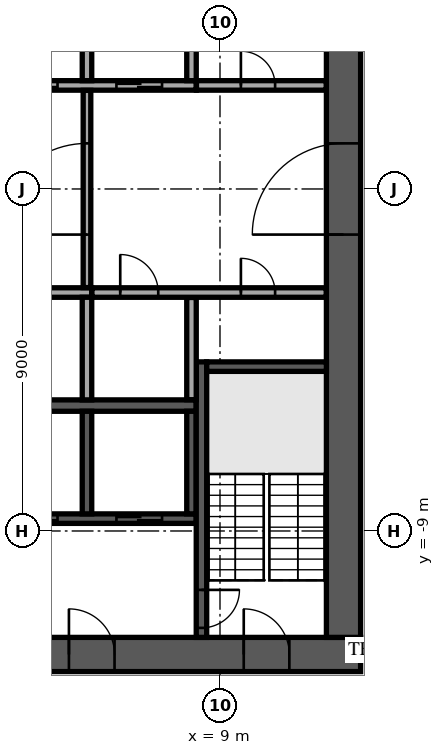
"""IFC4 building model, lengths in metres.
Left out: names, types, materials, properties, quantities, classifications, styles, units other than length and angle.
Written with IfcOpenShell. Run it as: python <this file> out.ifc"""

import sys

from ifc_helpers import new_model, si_unit, direction, frame, frame_2d, origin, place, context, subcontext, project, spatial, rectangle, extrude, element, fill, save


model = new_model("IFC4")
c1 = context("Model", 3, precision=1e-05, world=origin(), true_north=direction((0.0, 1.0)))
c2 = subcontext(c1, "Body", "Model", "MODEL_VIEW")
j1 = project(units=[si_unit("LENGTHUNIT", "METRE"), si_unit("PLANEANGLEUNIT", "RADIAN")], contexts=[c1])
p1 = place(None, origin())
s1 = spatial("IfcSite", under=j1, at=p1, CompositionType="ELEMENT")
p2 = place(p1, origin())
s2 = spatial("IfcBuilding", under=s1, at=p2, CompositionType="ELEMENT")
p3 = place(p2, frame((0.0, 0.0, 197.3)))
s3 = spatial("IfcBuildingStorey", under=s2, at=p3, CompositionType="ELEMENT", Elevation=197.3)
p4 = place(p3, frame((-12.7, -12.25, 0.0), z_axis=(0.0, 0.0, 1.0), x_axis=(1.0, 0.0, 0.0)))
e1 = element("IfcWall", 1, at=p4, inside=s3, PredefinedType="SHEAR", context=c2, shape_type="SweptSolid", body=[
    extrude(rectangle(XDim=25.4, YDim=0.9, at=frame_2d((12.7, 0.0))), origin(), (0.0, 0.0, 1.0), 3.62),
])
p5 = place(p4, frame((7.6, 0.0, 0.0)))
e2 = element("IfcOpeningElement", 2, at=p5, cuts=e1, PredefinedType="OPENING", context=c2, shape_type="SweptSolid", body=[
    extrude(rectangle(XDim=2.0, YDim=2.1, at=frame_2d((1.0, 1.05))), frame((0.0, 0.46, 0.0), z_axis=(0.0, -1.0, 0.0), x_axis=(1.0, 0.0, 0.0)), (0.0, 0.0, 1.0), 0.92),
])
p6 = place(p4, frame((17.725, 0.0, 0.0)))
e3 = element("IfcOpeningElement", 3, at=p6, cuts=e1, PredefinedType="OPENING", context=c2, shape_type="SweptSolid", body=[
    extrude(rectangle(XDim=1.2, YDim=2.1, at=frame_2d((0.6, 1.05))), frame((0.0, 0.46, 0.0), z_axis=(0.0, -1.0, 0.0), x_axis=(1.0, 0.0, 0.0)), (0.0, 0.0, 1.0), 0.92),
])
p7 = place(p4, frame((1.875, 0.0, 0.0)))
e4 = element("IfcOpeningElement", 4, at=p7, cuts=e1, PredefinedType="OPENING", context=c2, shape_type="SweptSolid", body=[
    extrude(rectangle(XDim=1.2, YDim=2.1, at=frame_2d((0.6, 1.05))), frame((0.0, 0.46, 0.0), z_axis=(0.0, -1.0, 0.0), x_axis=(1.0, 0.0, 0.0)), (0.0, 0.0, 1.0), 0.92),
])
p8 = place(p4, frame((22.325, 0.0, 0.0)))
e5 = element("IfcOpeningElement", 5, at=p8, cuts=e1, PredefinedType="OPENING", context=c2, shape_type="SweptSolid", body=[
    extrude(rectangle(XDim=1.2, YDim=2.1, at=frame_2d((0.6, 1.05))), frame((0.0, 0.46, 0.0), z_axis=(0.0, -1.0, 0.0), x_axis=(1.0, 0.0, 0.0)), (0.0, 0.0, 1.0), 0.92),
])
p9 = place(p3, frame((12.25, -11.8, 0.0), z_axis=(0.0, 0.0, 1.0), x_axis=(0.0, 1.0, 0.0)))
e6 = element("IfcWall", 6, at=p9, inside=s3, PredefinedType="SHEAR", context=c2, shape_type="SweptSolid", body=[
    extrude(rectangle(XDim=23.6, YDim=0.9, at=frame_2d((11.8, 0.0))), origin(), (0.0, 0.0, 1.0), 3.62),
])
p10 = place(p9, frame((10.6, 0.0, 0.0)))
e7 = element("IfcOpeningElement", 7, at=p10, cuts=e6, PredefinedType="OPENING", context=c2, shape_type="SweptSolid", body=[
    extrude(rectangle(XDim=2.4, YDim=2.4, at=frame_2d((1.2, 1.2))), frame((0.0, 0.46, 0.0), z_axis=(0.0, -1.0, 0.0), x_axis=(1.0, 0.0, 0.0)), (0.0, 0.0, 1.0), 0.92),
])
p11 = place(p3, frame((-2.875, -5.7, 0.0), z_axis=(0.0, 0.0, 1.0), x_axis=(1.0, 0.0, 0.0)))
e8 = element("IfcWall", 8, at=p11, inside=s3, PredefinedType="SOLIDWALL", context=c2, shape_type="SweptSolid", body=[
    extrude(rectangle(XDim=11.25, YDim=0.3, at=frame_2d((5.625, 0.0))), origin(), (0.0, 0.0, 1.0), 3.62),
])
p12 = place(p3, frame((-8.375, 2.725, 0.0), z_axis=(0.0, 0.0, 1.0), x_axis=(1.0, 0.0, 0.0)))
e9 = element("IfcWall", 9, at=p12, inside=s3, PredefinedType="SOLIDWALL", context=c2, shape_type="SweptSolid", body=[
    extrude(rectangle(XDim=16.75, YDim=0.25, at=frame_2d((8.375, 0.0))), origin(), (0.0, 0.0, 1.0), 3.62),
])
p13 = place(p12, frame((0.9, 0.0, 0.0)))
e10 = element("IfcOpeningElement", 10, at=p13, cuts=e9, PredefinedType="OPENING", context=c2, shape_type="SweptSolid", body=[
    extrude(rectangle(XDim=1.2, YDim=2.1, at=frame_2d((0.6, 1.05))), frame((0.0, 0.135, 0.0), z_axis=(0.0, -1.0, 0.0), x_axis=(1.0, 0.0, 0.0)), (0.0, 0.0, 1.0), 0.27),
])
p14 = place(p12, frame((3.65, 0.0, 0.0)))
e11 = element("IfcOpeningElement", 11, at=p14, cuts=e9, PredefinedType="OPENING", context=c2, shape_type="SweptSolid", body=[
    extrude(rectangle(XDim=1.2, YDim=2.1, at=frame_2d((0.6, 1.05))), frame((0.0, 0.135, 0.0), z_axis=(0.0, -1.0, 0.0), x_axis=(1.0, 0.0, 0.0)), (0.0, 0.0, 1.0), 0.27),
])
p15 = place(p12, frame((6.4, 0.0, 0.0)))
e12 = element("IfcOpeningElement", 12, at=p15, cuts=e9, PredefinedType="OPENING", context=c2, shape_type="SweptSolid", body=[
    extrude(rectangle(XDim=1.2, YDim=2.1, at=frame_2d((0.6, 1.05))), frame((0.0, 0.135, 0.0), z_axis=(0.0, -1.0, 0.0), x_axis=(1.0, 0.0, 0.0)), (0.0, 0.0, 1.0), 0.27),
])
p16 = place(p12, frame((9.15, 0.0, 0.0)))
e13 = element("IfcOpeningElement", 13, at=p16, cuts=e9, PredefinedType="OPENING", context=c2, shape_type="SweptSolid", body=[
    extrude(rectangle(XDim=1.2, YDim=2.1, at=frame_2d((0.6, 1.05))), frame((0.0, 0.135, 0.0), z_axis=(0.0, -1.0, 0.0), x_axis=(1.0, 0.0, 0.0)), (0.0, 0.0, 1.0), 0.27),
])
p17 = place(p12, frame((11.9, 0.0, 0.0)))
e14 = element("IfcOpeningElement", 14, at=p17, cuts=e9, PredefinedType="OPENING", context=c2, shape_type="SweptSolid", body=[
    extrude(rectangle(XDim=1.2, YDim=2.1, at=frame_2d((0.6, 1.05))), frame((0.0, 0.135, 0.0), z_axis=(0.0, -1.0, 0.0), x_axis=(1.0, 0.0, 0.0)), (0.0, 0.0, 1.0), 0.27),
])
p18 = place(p12, frame((14.65, 0.0, 0.0)))
e15 = element("IfcOpeningElement", 15, at=p18, cuts=e9, PredefinedType="OPENING", context=c2, shape_type="SweptSolid", body=[
    extrude(rectangle(XDim=1.2, YDim=2.1, at=frame_2d((0.6, 1.05))), frame((0.0, 0.135, 0.0), z_axis=(0.0, -1.0, 0.0), x_axis=(1.0, 0.0, 0.0)), (0.0, 0.0, 1.0), 0.27),
])
for number, where, z_axis, x_axis in (
    (16, (5.5, 2.85, 0.0), (0.0, 0.0, 1.0), (0.0, 1.0, 0.0)),
    (17, (8.25, 2.85, 0.0), (0.0, 0.0, 1.0), (0.0, 1.0, 0.0)),
):
    element("IfcWall", number, at=place(p3, frame(where, z_axis=z_axis, x_axis=x_axis)), inside=s3, PredefinedType="SOLIDWALL", context=c2, shape_type="SweptSolid", body=[
        extrude(rectangle(XDim=2.7, YDim=0.25, at=frame_2d((1.35, 0.0))), origin(), (0.0, 0.0, 1.0), 3.62),
    ])
p19 = place(p3, frame((-2.875, -2.725, 0.0), z_axis=(0.0, 0.0, 1.0), x_axis=(1.0, 0.0, 0.0)))
e18 = element("IfcWall", 18, at=p19, inside=s3, PredefinedType="SOLIDWALL", context=c2, shape_type="SweptSolid", body=[
    extrude(rectangle(XDim=8.5, YDim=0.25, at=frame_2d((4.25, 0.0))), origin(), (0.0, 0.0, 1.0), 3.62),
])
p20 = place(p3, frame((5.5, -5.55, 0.0), z_axis=(0.0, 0.0, 1.0), x_axis=(0.0, 1.0, 0.0)))
e19 = element("IfcWall", 19, at=p20, inside=s3, PredefinedType="SOLIDWALL", context=c2, shape_type="SweptSolid", body=[
    extrude(rectangle(XDim=2.7, YDim=0.25, at=frame_2d((1.35, 0.0))), origin(), (0.0, 0.0, 1.0), 3.62),
])
p21 = place(p3, frame((-2.875, -8.675, 0.0), z_axis=(0.0, 0.0, 1.0), x_axis=(1.0, 0.0, 0.0)))
e20 = element("IfcWall", 20, at=p21, inside=s3, PredefinedType="SOLIDWALL", context=c2, shape_type="SweptSolid", body=[
    extrude(rectangle(XDim=11.25, YDim=0.25, at=frame_2d((5.625, 0.0))), origin(), (0.0, 0.0, 1.0), 3.62),
])
p22 = place(p21, frame((0.9, 0.0, 0.0)))
e21 = element("IfcOpeningElement", 21, at=p22, cuts=e20, PredefinedType="OPENING", context=c2, shape_type="SweptSolid", body=[
    extrude(rectangle(XDim=1.2, YDim=2.1, at=frame_2d((0.6, 1.05))), frame((0.0, 0.135, 0.0), z_axis=(0.0, -1.0, 0.0), x_axis=(1.0, 0.0, 0.0)), (0.0, 0.0, 1.0), 0.27),
])
p23 = place(p21, frame((3.65, 0.0, 0.0)))
e22 = element("IfcOpeningElement", 22, at=p23, cuts=e20, PredefinedType="OPENING", context=c2, shape_type="SweptSolid", body=[
    extrude(rectangle(XDim=1.2, YDim=2.1, at=frame_2d((0.6, 1.05))), frame((0.0, 0.135, 0.0), z_axis=(0.0, -1.0, 0.0), x_axis=(1.0, 0.0, 0.0)), (0.0, 0.0, 1.0), 0.27),
])
p24 = place(p21, frame((6.4, 0.0, 0.0)))
e23 = element("IfcOpeningElement", 23, at=p24, cuts=e20, PredefinedType="OPENING", context=c2, shape_type="SweptSolid", body=[
    extrude(rectangle(XDim=1.2, YDim=2.1, at=frame_2d((0.6, 1.05))), frame((0.0, 0.135, 0.0), z_axis=(0.0, -1.0, 0.0), x_axis=(1.0, 0.0, 0.0)), (0.0, 0.0, 1.0), 0.27),
])
p25 = place(p21, frame((9.15, 0.0, 0.0)))
e24 = element("IfcOpeningElement", 24, at=p25, cuts=e20, PredefinedType="OPENING", context=c2, shape_type="SweptSolid", body=[
    extrude(rectangle(XDim=1.2, YDim=2.1, at=frame_2d((0.6, 1.05))), frame((0.0, 0.135, 0.0), z_axis=(0.0, -1.0, 0.0), x_axis=(1.0, 0.0, 0.0)), (0.0, 0.0, 1.0), 0.27),
])
for number, where, z_axis, x_axis in (
    (25, (5.5, -8.55, 0.0), (0.0, 0.0, 1.0), (0.0, 1.0, 0.0)),
    (26, (8.25, -8.55, 0.0), (0.0, 0.0, 1.0), (0.0, 1.0, 0.0)),
):
    element("IfcWall", number, at=place(p3, frame(where, z_axis=z_axis, x_axis=x_axis)), inside=s3, PredefinedType="SOLIDWALL", context=c2, shape_type="SweptSolid", body=[
        extrude(rectangle(XDim=2.7, YDim=0.25, at=frame_2d((1.35, 0.0))), origin(), (0.0, 0.0, 1.0), 3.62),
    ])
p26 = place(p3, frame((8.512, -4.55, 0.0), z_axis=(0.0, 0.0, 1.0), x_axis=(0.0, -1.0, 0.0)))
e27 = element("IfcWall", 27, at=p26, inside=s3, PredefinedType="SOLIDWALL", context=c2, shape_type="SweptSolid", body=[
    extrude(rectangle(XDim=7.25, YDim=0.275, at=frame_2d((3.625, 0.0))), origin(), (0.0, 0.0, 1.0), 3.62),
])
p27 = place(p26, frame((6.0, 0.0, 0.0)))
e28 = element("IfcOpeningElement", 28, at=p27, cuts=e27, PredefinedType="OPENING", context=c2, shape_type="SweptSolid", body=[
    extrude(rectangle(XDim=1.0, YDim=2.1, at=frame_2d((0.5, 1.05))), frame((0.0, 0.147, 0.0), z_axis=(0.0, -1.0, 0.0), x_axis=(1.0, 0.0, 0.0)), (0.0, 0.0, 1.0), 0.295),
])
p28 = place(p3, frame((8.65, -4.675, 0.0), z_axis=(0.0, 0.0, 1.0), x_axis=(1.0, 0.0, 0.0)))
e29 = element("IfcWall", 29, at=p28, inside=s3, PredefinedType="SOLIDWALL", context=c2, shape_type="SweptSolid", body=[
    extrude(rectangle(XDim=3.15, YDim=0.25, at=frame_2d((1.575, 0.0))), origin(), (0.0, 0.0, 1.0), 3.62),
])
p29 = place(p3, frame((8.25, -5.545, 0.0), z_axis=(0.0, 0.0, 1.0), x_axis=(0.0, 1.0, 0.0)))
e30 = element("IfcWall", 30, at=p29, inside=s3, PredefinedType="PARTITIONING", context=c2, shape_type="SweptSolid", body=[
    extrude(rectangle(XDim=2.69, YDim=0.25, at=frame_2d((1.345, 0.0))), origin(), (0.0, 0.0, 1.0), 3.62),
])
p30 = place(p3, frame((5.63, -2.725, 0.0), z_axis=(0.0, 0.0, 1.0), x_axis=(1.0, 0.0, 0.0)))
e31 = element("IfcWall", 31, at=p30, inside=s3, PredefinedType="PARTITIONING", context=c2, shape_type="SweptSolid", body=[
    extrude(rectangle(XDim=6.165, YDim=0.25, at=frame_2d((3.083, 0.0))), origin(), (0.0, 0.0, 1.0), 3.62),
])
p31 = place(p30, frame((0.745, 0.0, 0.0)))
e32 = element("IfcOpeningElement", 32, at=p31, cuts=e31, PredefinedType="OPENING", context=c2, shape_type="SweptSolid", body=[
    extrude(rectangle(XDim=1.0, YDim=2.1, at=frame_2d((0.5, 1.05))), frame((0.0, 0.135, 0.0), z_axis=(0.0, -1.0, 0.0), x_axis=(1.0, 0.0, 0.0)), (0.0, 0.0, 1.0), 0.27),
])
p32 = place(p30, frame((3.92, 0.0, 0.0)))
e33 = element("IfcOpeningElement", 33, at=p32, cuts=e31, PredefinedType="OPENING", context=c2, shape_type="SweptSolid", body=[
    extrude(rectangle(XDim=0.9, YDim=2.1, at=frame_2d((0.45, 1.05))), frame((0.0, 0.135, 0.0), z_axis=(0.0, -1.0, 0.0), x_axis=(1.0, 0.0, 0.0)), (0.0, 0.0, 1.0), 0.27),
])
p33 = place(p3, frame((5.5, -2.595, 0.0), z_axis=(0.0, 0.0, 1.0), x_axis=(0.0, 1.0, 0.0)))
e34 = element("IfcWall", 34, at=p33, inside=s3, PredefinedType="PARTITIONING", context=c2, shape_type="SweptSolid", body=[
    extrude(rectangle(XDim=5.19, YDim=0.2, at=frame_2d((2.595, 0.0))), origin(), (0.0, 0.0, 1.0), 3.62),
])
p34 = place(p33, frame((1.395, 0.0, 0.0)))
e35 = element("IfcOpeningElement", 35, at=p34, cuts=e34, PredefinedType="OPENING", context=c2, shape_type="SweptSolid", body=[
    extrude(rectangle(XDim=2.4, YDim=2.4, at=frame_2d((1.2, 1.2))), frame((0.0, 0.11, 0.0), z_axis=(0.0, -1.0, 0.0), x_axis=(1.0, 0.0, 0.0)), (0.0, 0.0, 1.0), 0.22),
])
p35 = place(p3, frame((8.38, 2.725, 0.0), z_axis=(0.0, 0.0, 1.0), x_axis=(1.0, 0.0, 0.0)))
e36 = element("IfcWall", 36, at=p35, inside=s3, PredefinedType="PARTITIONING", context=c2, shape_type="SweptSolid", body=[
    extrude(rectangle(XDim=3.415, YDim=0.25, at=frame_2d((1.708, 0.0))), origin(), (0.0, 0.0, 1.0), 3.62),
])
p36 = place(p35, frame((1.17, 0.0, 0.0)))
e37 = element("IfcOpeningElement", 37, at=p36, cuts=e36, PredefinedType="OPENING", context=c2, shape_type="SweptSolid", body=[
    extrude(rectangle(XDim=0.9, YDim=2.1, at=frame_2d((0.45, 1.05))), frame((0.0, 0.135, 0.0), z_axis=(0.0, -1.0, 0.0), x_axis=(1.0, 0.0, 0.0)), (0.0, 0.0, 1.0), 0.27),
])
p37 = place(p3, frame((-1.073, -34.773, 0.0), z_axis=(0.0, 0.0, 1.0), x_axis=(0.731351780381, 0.682000420333, 0.0)))
e38 = element("IfcWall", 38, at=p37, inside=s3, PredefinedType="STANDARD", context=c2, shape_type="SweptSolid", body=[
    extrude(rectangle(XDim=49.0, YDim=0.6, at=frame_2d((24.5, 0.0))), origin(), (0.0, 0.0, 1.0), 3.62),
])
p38 = place(p37, frame((1.227, 0.0, 0.9)))
e39 = element("IfcOpeningElement", 39, at=p38, cuts=e38, PredefinedType="OPENING", context=c2, shape_type="SweptSolid", body=[
    extrude(rectangle(XDim=2.0, YDim=2.1, at=frame_2d((1.0, 1.05))), frame((0.0, 0.31, 0.0), z_axis=(0.0, -1.0, 0.0), x_axis=(1.0, 0.0, 0.0)), (0.0, 0.0, 1.0), 0.62),
])
p39 = place(p37, frame((5.682, 0.0, 0.9)))
e40 = element("IfcOpeningElement", 40, at=p39, cuts=e38, PredefinedType="OPENING", context=c2, shape_type="SweptSolid", body=[
    extrude(rectangle(XDim=2.0, YDim=2.1, at=frame_2d((1.0, 1.05))), frame((0.0, 0.31, 0.0), z_axis=(0.0, -1.0, 0.0), x_axis=(1.0, 0.0, 0.0)), (0.0, 0.0, 1.0), 0.62),
])
p40 = place(p37, frame((14.591, 0.0, 0.9)))
e41 = element("IfcOpeningElement", 41, at=p40, cuts=e38, PredefinedType="OPENING", context=c2, shape_type="SweptSolid", body=[
    extrude(rectangle(XDim=2.0, YDim=2.1, at=frame_2d((1.0, 1.05))), frame((0.0, 0.31, 0.0), z_axis=(0.0, -1.0, 0.0), x_axis=(1.0, 0.0, 0.0)), (0.0, 0.0, 1.0), 0.62),
])
p41 = place(p37, frame((19.045, 0.0, 0.9)))
e42 = element("IfcOpeningElement", 42, at=p41, cuts=e38, PredefinedType="OPENING", context=c2, shape_type="SweptSolid", body=[
    extrude(rectangle(XDim=2.0, YDim=2.1, at=frame_2d((1.0, 1.05))), frame((0.0, 0.31, 0.0), z_axis=(0.0, -1.0, 0.0), x_axis=(1.0, 0.0, 0.0)), (0.0, 0.0, 1.0), 0.62),
])
p42 = place(p37, frame((23.5, 0.0, 0.9)))
e43 = element("IfcOpeningElement", 43, at=p42, cuts=e38, PredefinedType="OPENING", context=c2, shape_type="SweptSolid", body=[
    extrude(rectangle(XDim=2.0, YDim=2.1, at=frame_2d((1.0, 1.05))), frame((0.0, 0.31, 0.0), z_axis=(0.0, -1.0, 0.0), x_axis=(1.0, 0.0, 0.0)), (0.0, 0.0, 1.0), 0.62),
])
p43 = place(p37, frame((27.955, 0.0, 0.9)))
e44 = element("IfcOpeningElement", 44, at=p43, cuts=e38, PredefinedType="OPENING", context=c2, shape_type="SweptSolid", body=[
    extrude(rectangle(XDim=2.0, YDim=2.1, at=frame_2d((1.0, 1.05))), frame((0.0, 0.31, 0.0), z_axis=(0.0, -1.0, 0.0), x_axis=(1.0, 0.0, 0.0)), (0.0, 0.0, 1.0), 0.62),
])
p44 = place(p37, frame((32.409, 0.0, 0.9)))
e45 = element("IfcOpeningElement", 45, at=p44, cuts=e38, PredefinedType="OPENING", context=c2, shape_type="SweptSolid", body=[
    extrude(rectangle(XDim=2.0, YDim=2.1, at=frame_2d((1.0, 1.05))), frame((0.0, 0.31, 0.0), z_axis=(0.0, -1.0, 0.0), x_axis=(1.0, 0.0, 0.0)), (0.0, 0.0, 1.0), 0.62),
])
p45 = place(p37, frame((36.864, 0.0, 0.9)))
e46 = element("IfcOpeningElement", 46, at=p45, cuts=e38, PredefinedType="OPENING", context=c2, shape_type="SweptSolid", body=[
    extrude(rectangle(XDim=2.0, YDim=2.1, at=frame_2d((1.0, 1.05))), frame((0.0, 0.31, 0.0), z_axis=(0.0, -1.0, 0.0), x_axis=(1.0, 0.0, 0.0)), (0.0, 0.0, 1.0), 0.62),
])
p46 = place(p37, frame((41.318, 0.0, 0.9)))
e47 = element("IfcOpeningElement", 47, at=p46, cuts=e38, PredefinedType="OPENING", context=c2, shape_type="SweptSolid", body=[
    extrude(rectangle(XDim=2.0, YDim=2.1, at=frame_2d((1.0, 1.05))), frame((0.0, 0.31, 0.0), z_axis=(0.0, -1.0, 0.0), x_axis=(1.0, 0.0, 0.0)), (0.0, 0.0, 1.0), 0.62),
])
p47 = place(p37, frame((45.773, 0.0, 0.9)))
e48 = element("IfcOpeningElement", 48, at=p47, cuts=e38, PredefinedType="OPENING", context=c2, shape_type="SweptSolid", body=[
    extrude(rectangle(XDim=2.0, YDim=2.1, at=frame_2d((1.0, 1.05))), frame((0.0, 0.31, 0.0), z_axis=(0.0, -1.0, 0.0), x_axis=(1.0, 0.0, 0.0)), (0.0, 0.0, 1.0), 0.62),
])
p48 = place(p3, frame((1.576, -24.793, 0.0), z_axis=(0.0, 0.0, 1.0), x_axis=(0.731351215564, 0.68200102602, 0.0)))
e49 = element("IfcWall", 49, at=p48, inside=s3, PredefinedType="PARTITIONING", context=c2, shape_type="SweptSolid", body=[
    extrude(rectangle(XDim=31.513, YDim=0.15, at=frame_2d((15.757, 0.0))), origin(), (0.0, 0.0, 1.0), 3.17),
])
p49 = place(p48, frame((2.3, 0.0, 0.0)))
e50 = element("IfcOpeningElement", 50, at=p49, cuts=e49, PredefinedType="OPENING", context=c2, shape_type="SweptSolid", body=[
    extrude(rectangle(XDim=1.8, YDim=2.1, at=frame_2d((0.9, 1.05))), frame((0.0, 0.085, 0.0), z_axis=(0.0, -1.0, 0.0), x_axis=(1.0, 0.0, 0.0)), (0.0, 0.0, 1.0), 0.17),
])
p50 = place(p48, frame((11.883, 0.0, 0.0)))
e51 = element("IfcOpeningElement", 51, at=p50, cuts=e49, PredefinedType="OPENING", context=c2, shape_type="SweptSolid", body=[
    extrude(rectangle(XDim=1.0, YDim=2.1, at=frame_2d((0.5, 1.05))), frame((0.0, 0.085, 0.0), z_axis=(0.0, -1.0, 0.0), x_axis=(1.0, 0.0, 0.0)), (0.0, 0.0, 1.0), 0.17),
])
p51 = place(p48, frame((15.726, 0.0, 0.0)))
e52 = element("IfcOpeningElement", 52, at=p51, cuts=e49, PredefinedType="OPENING", context=c2, shape_type="SweptSolid", body=[
    extrude(rectangle(XDim=1.0, YDim=2.1, at=frame_2d((0.5, 1.05))), frame((0.0, 0.085, 0.0), z_axis=(0.0, -1.0, 0.0), x_axis=(1.0, 0.0, 0.0)), (0.0, 0.0, 1.0), 0.17),
])
p52 = place(p6, origin())
e53 = element("IfcDoor", 53, at=p52, inside=s3, OperationType="SINGLE_SWING_LEFT", PredefinedType="DOOR", context=c2, shape_type="SweptSolid", body=[
    extrude(rectangle(XDim=1.2, YDim=2.1, at=frame_2d((0.6, 1.05))), frame((0.0, 0.025, 0.0), z_axis=(0.0, -1.0, 0.0), x_axis=(1.0, 0.0, 0.0)), (0.0, 0.0, 1.0), 0.05),
])
fill(e3, e53)
p53 = place(p8, origin())
e54 = element("IfcDoor", 54, at=p53, inside=s3, OperationType="SINGLE_SWING_LEFT", PredefinedType="DOOR", context=c2, shape_type="SweptSolid", body=[
    extrude(rectangle(XDim=1.2, YDim=2.1, at=frame_2d((0.6, 1.05))), frame((0.0, 0.025, 0.0), z_axis=(0.0, -1.0, 0.0), x_axis=(1.0, 0.0, 0.0)), (0.0, 0.0, 1.0), 0.05),
])
fill(e5, e54)
p54 = place(p10, origin())
e55 = element("IfcDoor", 55, at=p54, inside=s3, OperationType="SINGLE_SWING_LEFT", PredefinedType="DOOR", context=c2, shape_type="SweptSolid", body=[
    extrude(rectangle(XDim=2.4, YDim=2.4, at=frame_2d((1.2, 1.2))), frame((0.0, 0.025, 0.0), z_axis=(0.0, -1.0, 0.0), x_axis=(1.0, 0.0, 0.0)), (0.0, 0.0, 1.0), 0.05),
])
fill(e7, e55)
p55 = place(p17, origin())
e56 = element("IfcDoor", 56, at=p55, inside=s3, OperationType="DOUBLE_DOOR_SLIDING", PredefinedType="DOOR", context=c2, shape_type="SweptSolid", body=[
    extrude(rectangle(XDim=1.2, YDim=2.1, at=frame_2d((0.6, 1.05))), frame((0.0, 0.025, 0.0), z_axis=(0.0, -1.0, 0.0), x_axis=(1.0, 0.0, 0.0)), (0.0, 0.0, 1.0), 0.05),
])
fill(e14, e56)
p56 = place(p18, origin())
e57 = element("IfcDoor", 57, at=p56, inside=s3, OperationType="DOUBLE_DOOR_SLIDING", PredefinedType="DOOR", context=c2, shape_type="SweptSolid", body=[
    extrude(rectangle(XDim=1.2, YDim=2.1, at=frame_2d((0.6, 1.05))), frame((0.0, 0.025, 0.0), z_axis=(0.0, -1.0, 0.0), x_axis=(1.0, 0.0, 0.0)), (0.0, 0.0, 1.0), 0.05),
])
fill(e15, e57)
p57 = place(p24, origin())
e58 = element("IfcDoor", 58, at=p57, inside=s3, OperationType="DOUBLE_DOOR_SLIDING", PredefinedType="DOOR", context=c2, shape_type="SweptSolid", body=[
    extrude(rectangle(XDim=1.2, YDim=2.1, at=frame_2d((0.6, 1.05))), frame((0.0, 0.025, 0.0), z_axis=(0.0, -1.0, 0.0), x_axis=(1.0, 0.0, 0.0)), (0.0, 0.0, 1.0), 0.05),
])
fill(e23, e58)
p58 = place(p25, origin())
e59 = element("IfcDoor", 59, at=p58, inside=s3, OperationType="DOUBLE_DOOR_SLIDING", PredefinedType="DOOR", context=c2, shape_type="SweptSolid", body=[
    extrude(rectangle(XDim=1.2, YDim=2.1, at=frame_2d((0.6, 1.05))), frame((0.0, 0.025, 0.0), z_axis=(0.0, -1.0, 0.0), x_axis=(1.0, 0.0, 0.0)), (0.0, 0.0, 1.0), 0.05),
])
fill(e24, e59)
p59 = place(p27, origin())
e60 = element("IfcDoor", 60, at=p59, inside=s3, OperationType="SINGLE_SWING_LEFT", PredefinedType="DOOR", context=c2, shape_type="SweptSolid", body=[
    extrude(rectangle(XDim=1.0, YDim=2.1, at=frame_2d((0.5, 1.05))), frame((0.0, 0.025, 0.0), z_axis=(0.0, -1.0, 0.0), x_axis=(1.0, 0.0, 0.0)), (0.0, 0.0, 1.0), 0.05),
])
fill(e28, e60)
p60 = place(p31, origin())
e61 = element("IfcDoor", 61, at=p60, inside=s3, OperationType="SINGLE_SWING_LEFT", PredefinedType="DOOR", context=c2, shape_type="SweptSolid", body=[
    extrude(rectangle(XDim=1.0, YDim=2.1, at=frame_2d((0.5, 1.05))), frame((0.0, 0.025, 0.0), z_axis=(0.0, -1.0, 0.0), x_axis=(1.0, 0.0, 0.0)), (0.0, 0.0, 1.0), 0.05),
])
fill(e32, e61)
p61 = place(p36, origin())
e62 = element("IfcDoor", 62, at=p61, inside=s3, OperationType="SINGLE_SWING_LEFT", PredefinedType="DOOR", context=c2, shape_type="SweptSolid", body=[
    extrude(rectangle(XDim=0.9, YDim=2.1, at=frame_2d((0.45, 1.05))), frame((0.0, 0.025, 0.0), z_axis=(0.0, -1.0, 0.0), x_axis=(1.0, 0.0, 0.0)), (0.0, 0.0, 1.0), 0.05),
])
fill(e37, e62)
p62 = place(p32, origin())
e63 = element("IfcDoor", 63, at=p62, inside=s3, OperationType="SINGLE_SWING_LEFT", PredefinedType="DOOR", context=c2, shape_type="SweptSolid", body=[
    extrude(rectangle(XDim=0.9, YDim=2.1, at=frame_2d((0.45, 1.05))), frame((0.0, 0.025, 0.0), z_axis=(0.0, -1.0, 0.0), x_axis=(1.0, 0.0, 0.0)), (0.0, 0.0, 1.0), 0.05),
])
fill(e33, e63)
p63 = place(p34, origin())
e64 = element("IfcDoor", 64, at=p63, inside=s3, OperationType="SINGLE_SWING_LEFT", PredefinedType="DOOR", context=c2, shape_type="SweptSolid", body=[
    extrude(rectangle(XDim=2.4, YDim=2.4, at=frame_2d((1.2, 1.2))), frame((0.0, 0.025, 0.0), z_axis=(0.0, -1.0, 0.0), x_axis=(1.0, 0.0, 0.0)), (0.0, 0.0, 1.0), 0.05),
])
fill(e35, e64)
save(model, sys.argv[1])
